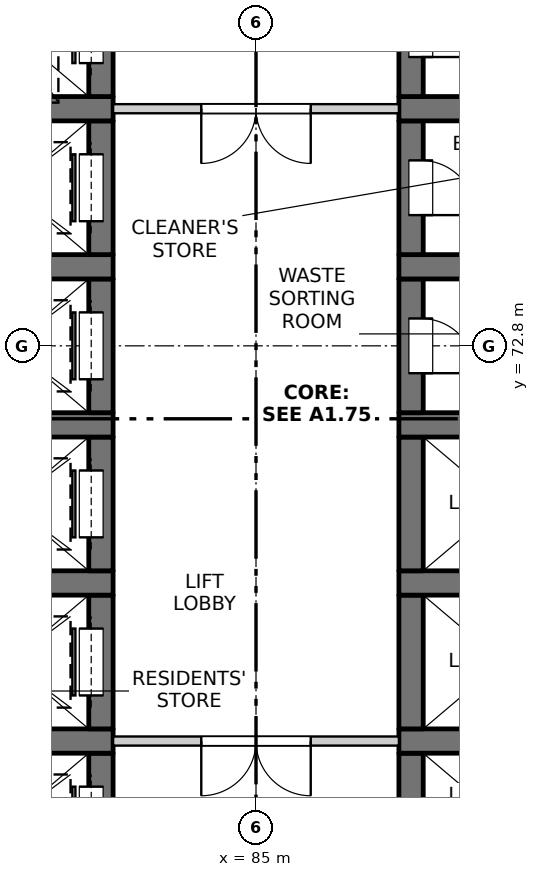
"""IFC4 building model, lengths in metres.
Left out: names, types, materials, properties, quantities, classifications, styles, units other than length and angle.
Written with IfcOpenShell. Run it as: python <this file> out.ifc"""

import sys

from ifc_helpers import new_model, si_unit, direction, frame, frame_2d, origin, place, context, subcontext, project, spatial, rectangle, extrude, element, fill, save


model = new_model("IFC4")
c1 = context("Model", 3, precision=1e-05, world=origin(), true_north=direction((0.0, 1.0)))
c2 = subcontext(c1, "Body", "Model", "MODEL_VIEW")
j1 = project(units=[si_unit("LENGTHUNIT", "METRE"), si_unit("PLANEANGLEUNIT", "RADIAN")], contexts=[c1])
p1 = place(None, origin())
s1 = spatial("IfcSite", under=j1, at=p1, CompositionType="ELEMENT")
p2 = place(p1, origin())
s2 = spatial("IfcBuilding", under=s1, at=p2, CompositionType="ELEMENT")
p3 = place(p2, frame((0.0, 0.0, 43.3)))
s3 = spatial("IfcBuildingStorey", under=s2, at=p3, CompositionType="ELEMENT", Elevation=43.3)
p4 = place(p3, frame((82.45, 63.9, -0.25), z_axis=(0.0, 0.0, 1.0), x_axis=(0.0, 1.0, 0.0)))
e1 = element("IfcWall", 1, at=p4, inside=s3, PredefinedType="SOLIDWALL", context=c2, shape_type="SweptSolid", body=[
    extrude(rectangle(XDim=2.2, YDim=0.4, at=frame_2d((1.1, 0.0))), origin(), (0.0, 0.0, 1.0), 3.35),
])
p5 = place(p4, frame((0.55, 0.0, 0.25)))
e2 = element("IfcOpeningElement", 2, at=p5, cuts=e1, PredefinedType="OPENING", context=c2, shape_type="SweptSolid", body=[
    extrude(rectangle(XDim=1.1, YDim=2.1, at=frame_2d((0.55, 1.05))), frame((0.0, 0.21, 0.0), z_axis=(0.0, -1.0, 0.0), x_axis=(1.0, 0.0, 0.0)), (0.0, 0.0, 1.0), 0.42),
])
p6 = place(p3, frame((79.65, 66.3, -0.25), z_axis=(0.0, 0.0, 1.0), x_axis=(1.0, 0.0, 0.0)))
e3 = element("IfcWall", 3, at=p6, inside=s3, PredefinedType="SOLIDWALL", context=c2, shape_type="SweptSolid", body=[
    extrude(rectangle(XDim=3.0, YDim=0.4, at=frame_2d((1.5, 0.0))), origin(), (0.0, 0.0, 1.0), 3.35),
])
p7 = place(p3, frame((82.45, 66.5, -0.25), z_axis=(0.0, 0.0, 1.0), x_axis=(0.0, 1.0, 0.0)))
e4 = element("IfcWall", 4, at=p7, inside=s3, PredefinedType="SOLIDWALL", context=c2, shape_type="SweptSolid", body=[
    extrude(rectangle(XDim=2.2, YDim=0.4, at=frame_2d((1.1, 0.0))), origin(), (0.0, 0.0, 1.0), 3.35),
])
p8 = place(p7, frame((0.55, 0.0, 0.25)))
e5 = element("IfcOpeningElement", 5, at=p8, cuts=e4, PredefinedType="OPENING", context=c2, shape_type="SweptSolid", body=[
    extrude(rectangle(XDim=1.1, YDim=2.1, at=frame_2d((0.55, 1.05))), frame((0.0, 0.21, 0.0), z_axis=(0.0, -1.0, 0.0), x_axis=(1.0, 0.0, 0.0)), (0.0, 0.0, 1.0), 0.42),
])
p9 = place(p3, frame((79.65, 68.9, -0.25), z_axis=(0.0, 0.0, 1.0), x_axis=(1.0, 0.0, 0.0)))
e6 = element("IfcWall", 6, at=p9, inside=s3, PredefinedType="SOLIDWALL", context=c2, shape_type="SweptSolid", body=[
    extrude(rectangle(XDim=3.0, YDim=0.4, at=frame_2d((1.5, 0.0))), origin(), (0.0, 0.0, 1.0), 3.35),
])
p10 = place(p3, frame((82.45, 69.1, -0.25), z_axis=(0.0, 0.0, 1.0), x_axis=(0.0, 1.0, 0.0)))
e7 = element("IfcWall", 7, at=p10, inside=s3, PredefinedType="SOLIDWALL", context=c2, shape_type="SweptSolid", body=[
    extrude(rectangle(XDim=2.2, YDim=0.4, at=frame_2d((1.1, 0.0))), origin(), (0.0, 0.0, 1.0), 3.35),
])
p11 = place(p10, frame((0.55, 0.0, 0.25)))
e8 = element("IfcOpeningElement", 8, at=p11, cuts=e7, PredefinedType="OPENING", context=c2, shape_type="SweptSolid", body=[
    extrude(rectangle(XDim=1.1, YDim=2.1, at=frame_2d((0.55, 1.05))), frame((0.0, 0.21, 0.0), z_axis=(0.0, -1.0, 0.0), x_axis=(1.0, 0.0, 0.0)), (0.0, 0.0, 1.0), 0.42),
])
p12 = place(p3, frame((79.65, 71.5, -0.25), z_axis=(0.0, 0.0, 1.0), x_axis=(1.0, 0.0, 0.0)))
e9 = element("IfcWall", 9, at=p12, inside=s3, PredefinedType="SOLIDWALL", context=c2, shape_type="SweptSolid", body=[
    extrude(rectangle(XDim=3.0, YDim=0.4, at=frame_2d((1.5, 0.0))), origin(), (0.0, 0.0, 1.0), 3.35),
])
p13 = place(p3, frame((82.45, 71.7, -0.25), z_axis=(0.0, 0.0, 1.0), x_axis=(0.0, 1.0, 0.0)))
e10 = element("IfcWall", 10, at=p13, inside=s3, PredefinedType="SOLIDWALL", context=c2, shape_type="SweptSolid", body=[
    extrude(rectangle(XDim=2.2, YDim=0.4, at=frame_2d((1.1, 0.0))), origin(), (0.0, 0.0, 1.0), 3.35),
])
p14 = place(p13, frame((0.55, 0.0, 0.25)))
e11 = element("IfcOpeningElement", 11, at=p14, cuts=e10, PredefinedType="OPENING", context=c2, shape_type="SweptSolid", body=[
    extrude(rectangle(XDim=1.1, YDim=2.1, at=frame_2d((0.55, 1.05))), frame((0.0, 0.21, 0.0), z_axis=(0.0, -1.0, 0.0), x_axis=(1.0, 0.0, 0.0)), (0.0, 0.0, 1.0), 0.42),
])
p15 = place(p3, frame((79.65, 74.1, -0.25), z_axis=(0.0, 0.0, 1.0), x_axis=(1.0, 0.0, 0.0)))
e12 = element("IfcWall", 12, at=p15, inside=s3, PredefinedType="SOLIDWALL", context=c2, shape_type="SweptSolid", body=[
    extrude(rectangle(XDim=3.0, YDim=0.4, at=frame_2d((1.5, 0.0))), origin(), (0.0, 0.0, 1.0), 3.35),
])
p16 = place(p3, frame((82.45, 74.3, -0.25), z_axis=(0.0, 0.0, 1.0), x_axis=(0.0, 1.0, 0.0)))
e13 = element("IfcWall", 13, at=p16, inside=s3, PredefinedType="SOLIDWALL", context=c2, shape_type="SweptSolid", body=[
    extrude(rectangle(XDim=2.2, YDim=0.4, at=frame_2d((1.1, 0.0))), origin(), (0.0, 0.0, 1.0), 3.35),
])
p17 = place(p16, frame((0.55, 0.0, 0.25)))
e14 = element("IfcOpeningElement", 14, at=p17, cuts=e13, PredefinedType="OPENING", context=c2, shape_type="SweptSolid", body=[
    extrude(rectangle(XDim=1.1, YDim=2.1, at=frame_2d((0.55, 1.05))), frame((0.0, 0.21, 0.0), z_axis=(0.0, -1.0, 0.0), x_axis=(1.0, 0.0, 0.0)), (0.0, 0.0, 1.0), 0.42),
])
p18 = place(p3, frame((79.65, 76.7, -0.25), z_axis=(0.0, 0.0, 1.0), x_axis=(1.0, 0.0, 0.0)))
e15 = element("IfcWall", 15, at=p18, inside=s3, PredefinedType="SOLIDWALL", context=c2, shape_type="SweptSolid", body=[
    extrude(rectangle(XDim=3.0, YDim=0.4, at=frame_2d((1.5, 0.0))), origin(), (0.0, 0.0, 1.0), 3.35),
])
p19 = place(p3, frame((82.45, 76.9, -0.25), z_axis=(0.0, 0.0, 1.0), x_axis=(0.0, 1.0, 0.0)))
e16 = element("IfcWall", 16, at=p19, inside=s3, PredefinedType="SOLIDWALL", context=c2, shape_type="SweptSolid", body=[
    extrude(rectangle(XDim=2.2, YDim=0.4, at=frame_2d((1.1, 0.0))), origin(), (0.0, 0.0, 1.0), 3.35),
])
p20 = place(p19, frame((0.55, 0.0, 0.25)))
e17 = element("IfcOpeningElement", 17, at=p20, cuts=e16, PredefinedType="OPENING", context=c2, shape_type="SweptSolid", body=[
    extrude(rectangle(XDim=1.1, YDim=2.1, at=frame_2d((0.55, 1.05))), frame((0.0, 0.21, 0.0), z_axis=(0.0, -1.0, 0.0), x_axis=(1.0, 0.0, 0.0)), (0.0, 0.0, 1.0), 0.42),
])
p21 = place(p3, frame((87.55, 63.9, -0.25), z_axis=(0.0, 0.0, 1.0), x_axis=(0.0, 1.0, 0.0)))
e18 = element("IfcWall", 18, at=p21, inside=s3, PredefinedType="SOLIDWALL", context=c2, shape_type="SweptSolid", body=[
    extrude(rectangle(XDim=2.2, YDim=0.4, at=frame_2d((1.1, 0.0))), origin(), (0.0, 0.0, 1.0), 3.35),
])
p22 = place(p3, frame((87.35, 66.3, -0.25), z_axis=(0.0, 0.0, 1.0), x_axis=(1.0, 0.0, 0.0)))
e19 = element("IfcWall", 19, at=p22, inside=s3, PredefinedType="SOLIDWALL", context=c2, shape_type="SweptSolid", body=[
    extrude(rectangle(XDim=3.0, YDim=0.4, at=frame_2d((1.5, 0.0))), origin(), (0.0, 0.0, 1.0), 3.35),
])
p23 = place(p3, frame((87.55, 66.5, -0.25), z_axis=(0.0, 0.0, 1.0), x_axis=(0.0, 1.0, 0.0)))
e20 = element("IfcWall", 20, at=p23, inside=s3, PredefinedType="SOLIDWALL", context=c2, shape_type="SweptSolid", body=[
    extrude(rectangle(XDim=2.2, YDim=0.4, at=frame_2d((1.1, 0.0))), origin(), (0.0, 0.0, 1.0), 3.35),
])
p24 = place(p3, frame((87.35, 68.9, -0.25), z_axis=(0.0, 0.0, 1.0), x_axis=(1.0, 0.0, 0.0)))
e21 = element("IfcWall", 21, at=p24, inside=s3, PredefinedType="SOLIDWALL", context=c2, shape_type="SweptSolid", body=[
    extrude(rectangle(XDim=3.0, YDim=0.4, at=frame_2d((1.5, 0.0))), origin(), (0.0, 0.0, 1.0), 3.35),
])
p25 = place(p3, frame((87.55, 69.1, -0.25), z_axis=(0.0, 0.0, 1.0), x_axis=(0.0, 1.0, 0.0)))
e22 = element("IfcWall", 22, at=p25, inside=s3, PredefinedType="SOLIDWALL", context=c2, shape_type="SweptSolid", body=[
    extrude(rectangle(XDim=2.2, YDim=0.4, at=frame_2d((1.1, 0.0))), origin(), (0.0, 0.0, 1.0), 3.35),
])
p26 = place(p3, frame((87.35, 71.5, -0.25), z_axis=(0.0, 0.0, 1.0), x_axis=(1.0, 0.0, 0.0)))
e23 = element("IfcWall", 23, at=p26, inside=s3, PredefinedType="SOLIDWALL", context=c2, shape_type="SweptSolid", body=[
    extrude(rectangle(XDim=3.0, YDim=0.4, at=frame_2d((1.5, 0.0))), origin(), (0.0, 0.0, 1.0), 3.35),
])
p27 = place(p3, frame((87.55, 71.7, -0.25), z_axis=(0.0, 0.0, 1.0), x_axis=(0.0, 1.0, 0.0)))
e24 = element("IfcWall", 24, at=p27, inside=s3, PredefinedType="SOLIDWALL", context=c2, shape_type="SweptSolid", body=[
    extrude(rectangle(XDim=2.2, YDim=0.4, at=frame_2d((1.1, 0.0))), origin(), (0.0, 0.0, 1.0), 3.35),
])
p28 = place(p27, frame((0.65, 0.0, 0.25)))
e25 = element("IfcOpeningElement", 25, at=p28, cuts=e24, PredefinedType="OPENING", context=c2, shape_type="SweptSolid", body=[
    extrude(rectangle(XDim=0.9, YDim=2.1, at=frame_2d((0.45, 1.05))), frame((0.0, 0.21, 0.0), z_axis=(0.0, -1.0, 0.0), x_axis=(1.0, 0.0, 0.0)), (0.0, 0.0, 1.0), 0.42),
])
p29 = place(p3, frame((87.35, 74.1, -0.25), z_axis=(0.0, 0.0, 1.0), x_axis=(1.0, 0.0, 0.0)))
e26 = element("IfcWall", 26, at=p29, inside=s3, PredefinedType="SOLIDWALL", context=c2, shape_type="SweptSolid", body=[
    extrude(rectangle(XDim=3.0, YDim=0.4, at=frame_2d((1.5, 0.0))), origin(), (0.0, 0.0, 1.0), 3.35),
])
p30 = place(p3, frame((87.55, 74.3, -0.25), z_axis=(0.0, 0.0, 1.0), x_axis=(0.0, 1.0, 0.0)))
e27 = element("IfcWall", 27, at=p30, inside=s3, PredefinedType="SOLIDWALL", context=c2, shape_type="SweptSolid", body=[
    extrude(rectangle(XDim=2.2, YDim=0.4, at=frame_2d((1.1, 0.0))), origin(), (0.0, 0.0, 1.0), 3.35),
])
p31 = place(p30, frame((0.65, 0.0, 0.25)))
e28 = element("IfcOpeningElement", 28, at=p31, cuts=e27, PredefinedType="OPENING", context=c2, shape_type="SweptSolid", body=[
    extrude(rectangle(XDim=0.9, YDim=2.1, at=frame_2d((0.45, 1.05))), frame((0.0, 0.21, 0.0), z_axis=(0.0, -1.0, 0.0), x_axis=(1.0, 0.0, 0.0)), (0.0, 0.0, 1.0), 0.42),
])
p32 = place(p3, frame((87.35, 76.7, -0.25), z_axis=(0.0, 0.0, 1.0), x_axis=(1.0, 0.0, 0.0)))
e29 = element("IfcWall", 29, at=p32, inside=s3, PredefinedType="SOLIDWALL", context=c2, shape_type="SweptSolid", body=[
    extrude(rectangle(XDim=3.0, YDim=0.4, at=frame_2d((1.5, 0.0))), origin(), (0.0, 0.0, 1.0), 3.35),
])
p33 = place(p3, frame((87.55, 76.9, -0.25), z_axis=(0.0, 0.0, 1.0), x_axis=(0.0, 1.0, 0.0)))
e30 = element("IfcWall", 30, at=p33, inside=s3, PredefinedType="SOLIDWALL", context=c2, shape_type="SweptSolid", body=[
    extrude(rectangle(XDim=2.2, YDim=0.4, at=frame_2d((1.1, 0.0))), origin(), (0.0, 0.0, 1.0), 3.35),
])
p34 = place(p33, frame((0.65, 0.0, 0.25)))
e31 = element("IfcOpeningElement", 31, at=p34, cuts=e30, PredefinedType="OPENING", context=c2, shape_type="SweptSolid", body=[
    extrude(rectangle(XDim=0.9, YDim=2.1, at=frame_2d((0.45, 1.05))), frame((0.0, 0.21, 0.0), z_axis=(0.0, -1.0, 0.0), x_axis=(1.0, 0.0, 0.0)), (0.0, 0.0, 1.0), 0.42),
])
p35 = place(p3, frame((82.65, 66.3, 0.0), z_axis=(0.0, 0.0, 1.0), x_axis=(1.0, 0.0, 0.0)))
e32 = element("IfcWall", 32, at=p35, inside=s3, PredefinedType="PARTITIONING", context=c2, shape_type="SweptSolid", body=[
    extrude(rectangle(XDim=4.7, YDim=0.15, at=frame_2d((2.35, 0.0))), origin(), (0.0, 0.0, 1.0), 3.1),
])
p36 = place(p35, frame((1.45, 0.0, 0.0)))
e33 = element("IfcOpeningElement", 33, at=p36, cuts=e32, PredefinedType="OPENING", context=c2, shape_type="SweptSolid", body=[
    extrude(rectangle(XDim=1.8, YDim=2.1, at=frame_2d((0.9, 1.05))), frame((0.0, 0.085, 0.0), z_axis=(0.0, -1.0, 0.0), x_axis=(1.0, 0.0, 0.0)), (0.0, 0.0, 1.0), 0.17),
])
p37 = place(p3, frame((82.65, 76.7, 0.0), z_axis=(0.0, 0.0, 1.0), x_axis=(1.0, 0.0, 0.0)))
e34 = element("IfcWall", 34, at=p37, inside=s3, PredefinedType="PARTITIONING", context=c2, shape_type="SweptSolid", body=[
    extrude(rectangle(XDim=4.7, YDim=0.15, at=frame_2d((2.35, 0.0))), origin(), (0.0, 0.0, 1.0), 3.1),
])
p38 = place(p37, frame((1.45, 0.0, 0.0)))
e35 = element("IfcOpeningElement", 35, at=p38, cuts=e34, PredefinedType="OPENING", context=c2, shape_type="SweptSolid", body=[
    extrude(rectangle(XDim=1.8, YDim=2.1, at=frame_2d((0.9, 1.05))), frame((0.0, 0.085, 0.0), z_axis=(0.0, -1.0, 0.0), x_axis=(1.0, 0.0, 0.0)), (0.0, 0.0, 1.0), 0.17),
])
p39 = place(p5, origin())
e36 = element("IfcDoor", 36, at=p39, inside=s3, OperationType="SLIDING_TO_RIGHT", PredefinedType="DOOR", context=c2, shape_type="SweptSolid", body=[
    extrude(rectangle(XDim=1.1, YDim=2.1, at=frame_2d((0.55, 1.05))), frame((0.0, 0.185, 0.0), z_axis=(0.0, -1.0, 0.0), x_axis=(1.0, 0.0, 0.0)), (0.0, 0.0, 1.0), 0.05),
])
fill(e2, e36)
p40 = place(p36, origin())
e37 = element("IfcDoor", 37, at=p40, inside=s3, OperationType="DOUBLE_DOOR_SINGLE_SWING", PredefinedType="DOOR", context=c2, shape_type="SweptSolid", body=[
    extrude(rectangle(XDim=1.8, YDim=2.1, at=frame_2d((0.9, 1.05))), frame((0.0, 0.025, 0.0), z_axis=(0.0, -1.0, 0.0), x_axis=(1.0, 0.0, 0.0)), (0.0, 0.0, 1.0), 0.05),
])
fill(e33, e37)
p41 = place(p8, origin())
e38 = element("IfcDoor", 38, at=p41, inside=s3, OperationType="SLIDING_TO_RIGHT", PredefinedType="DOOR", context=c2, shape_type="SweptSolid", body=[
    extrude(rectangle(XDim=1.1, YDim=2.1, at=frame_2d((0.55, 1.05))), frame((0.0, 0.185, 0.0), z_axis=(0.0, -1.0, 0.0), x_axis=(1.0, 0.0, 0.0)), (0.0, 0.0, 1.0), 0.05),
])
fill(e5, e38)
p42 = place(p11, origin())
e39 = element("IfcDoor", 39, at=p42, inside=s3, OperationType="SLIDING_TO_LEFT", PredefinedType="DOOR", context=c2, shape_type="SweptSolid", body=[
    extrude(rectangle(XDim=1.1, YDim=2.1, at=frame_2d((0.55, 1.05))), frame((0.0, 0.185, 0.0), z_axis=(0.0, -1.0, 0.0), x_axis=(1.0, 0.0, 0.0)), (0.0, 0.0, 1.0), 0.05),
])
fill(e8, e39)
p43 = place(p14, origin())
e40 = element("IfcDoor", 40, at=p43, inside=s3, OperationType="SLIDING_TO_LEFT", PredefinedType="DOOR", context=c2, shape_type="SweptSolid", body=[
    extrude(rectangle(XDim=1.1, YDim=2.1, at=frame_2d((0.55, 1.05))), frame((0.0, 0.185, 0.0), z_axis=(0.0, -1.0, 0.0), x_axis=(1.0, 0.0, 0.0)), (0.0, 0.0, 1.0), 0.05),
])
fill(e11, e40)
p44 = place(p28, origin())
e41 = element("IfcDoor", 41, at=p44, inside=s3, OperationType="SINGLE_SWING_RIGHT", PredefinedType="DOOR", context=c2, shape_type="SweptSolid", body=[
    extrude(rectangle(XDim=0.9, YDim=2.1, at=frame_2d((0.45, 1.05))), frame((0.0, -0.135, 0.0), z_axis=(0.0, -1.0, 0.0), x_axis=(1.0, 0.0, 0.0)), (0.0, 0.0, 1.0), 0.05),
])
fill(e25, e41)
p45 = place(p17, origin())
e42 = element("IfcDoor", 42, at=p45, inside=s3, OperationType="SLIDING_TO_LEFT", PredefinedType="DOOR", context=c2, shape_type="SweptSolid", body=[
    extrude(rectangle(XDim=1.1, YDim=2.1, at=frame_2d((0.55, 1.05))), frame((0.0, 0.185, 0.0), z_axis=(0.0, -1.0, 0.0), x_axis=(1.0, 0.0, 0.0)), (0.0, 0.0, 1.0), 0.05),
])
fill(e14, e42)
p46 = place(p31, origin())
e43 = element("IfcDoor", 43, at=p46, inside=s3, OperationType="SINGLE_SWING_RIGHT", PredefinedType="DOOR", context=c2, shape_type="SweptSolid", body=[
    extrude(rectangle(XDim=0.9, YDim=2.1, at=frame_2d((0.45, 1.05))), frame((0.0, -0.135, 0.0), z_axis=(0.0, -1.0, 0.0), x_axis=(1.0, 0.0, 0.0)), (0.0, 0.0, 1.0), 0.05),
])
fill(e28, e43)
p47 = place(p38, origin())
e44 = element("IfcDoor", 44, at=p47, inside=s3, OperationType="DOUBLE_DOOR_SINGLE_SWING", PredefinedType="DOOR", context=c2, shape_type="SweptSolid", body=[
    extrude(rectangle(XDim=1.8, YDim=2.1, at=frame_2d((0.9, 1.05))), frame((0.0, 0.025, 0.0), z_axis=(0.0, -1.0, 0.0), x_axis=(1.0, 0.0, 0.0)), (0.0, 0.0, 1.0), 0.05),
])
fill(e35, e44)
p48 = place(p20, origin())
e45 = element("IfcDoor", 45, at=p48, inside=s3, OperationType="SLIDING_TO_LEFT", PredefinedType="DOOR", context=c2, shape_type="SweptSolid", body=[
    extrude(rectangle(XDim=1.1, YDim=2.1, at=frame_2d((0.55, 1.05))), frame((0.0, 0.185, 0.0), z_axis=(0.0, -1.0, 0.0), x_axis=(1.0, 0.0, 0.0)), (0.0, 0.0, 1.0), 0.05),
])
fill(e17, e45)
p49 = place(p34, origin())
e46 = element("IfcDoor", 46, at=p49, inside=s3, OperationType="SINGLE_SWING_RIGHT", PredefinedType="DOOR", context=c2, shape_type="SweptSolid", body=[
    extrude(rectangle(XDim=0.9, YDim=2.1, at=frame_2d((0.45, 1.05))), frame((0.0, -0.135, 0.0), z_axis=(0.0, -1.0, 0.0), x_axis=(1.0, 0.0, 0.0)), (0.0, 0.0, 1.0), 0.05),
])
fill(e31, e46)
save(model, sys.argv[1])
